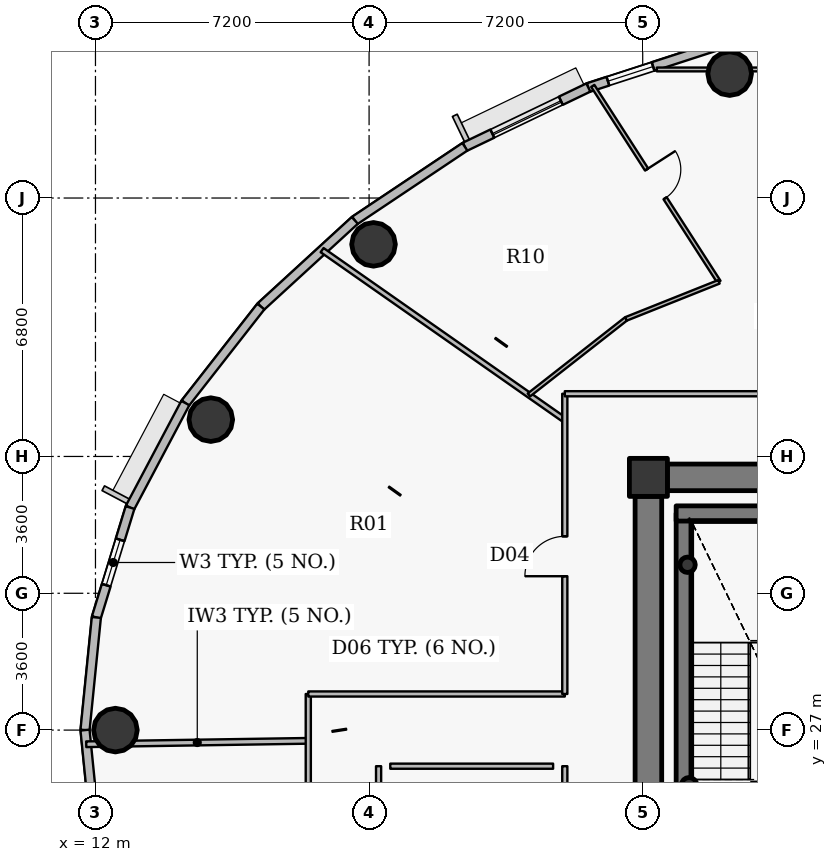
"""IFC4 building model, lengths in metres.
Left out: names, types, materials, properties, quantities, classifications, styles, units other than length and angle.
Written with IfcOpenShell. Run it as: python <this file> out.ifc"""

import sys

from ifc_helpers import new_model, si_unit, direction, frame, frame_2d, origin, origin_2d, place, context, subcontext, project, spatial, rectangle, hollow_circle, extrude, source, transform, mapped, element, fill, save


model = new_model("IFC4")
c1 = context("Model", 3, precision=1e-05, world=origin(), true_north=direction((0.0, 1.0)))
c2 = subcontext(c1, "Body", "Model", "MODEL_VIEW")
j1 = project(units=[si_unit("LENGTHUNIT", "METRE"), si_unit("PLANEANGLEUNIT", "RADIAN")], contexts=[c1])
p1 = place(None, origin())
s1 = spatial("IfcSite", under=j1, at=p1, CompositionType="ELEMENT")
p2 = place(p1, origin())
s2 = spatial("IfcBuilding", under=s1, at=p2, CompositionType="ELEMENT")
p3 = place(p2, frame((0.0, 0.0, 251.55)))
s3 = spatial("IfcBuildingStorey", under=s2, at=p3, CompositionType="ELEMENT", Elevation=251.55)
p4 = place(p3, frame((26.55, 33.65, 0.0), z_axis=(0.0, 0.0, 1.0), x_axis=(1.0, 0.0, 0.0)))
e1 = element("IfcColumn", 1, at=p4, inside=s3, PredefinedType="COLUMN", context=c2, shape_type="SweptSolid", body=[
    extrude(rectangle(XDim=1.0, YDim=1.0, at=origin_2d()), origin(), (0.0, 0.0, 1.0), 3.75),
])
p5 = place(p3, frame((27.48, 24.1, 0.0), z_axis=(0.0, 0.0, 1.0), x_axis=(0.0, 1.0, 0.0)))
e2 = element("IfcWall", 2, at=p5, inside=s3, PredefinedType="SHEAR", context=c2, shape_type="SweptSolid", body=[
    extrude(rectangle(XDim=8.6, YDim=0.4, at=frame_2d((4.3, 0.0))), origin(), (0.0, 0.0, 1.0), 3.75),
])
p6 = place(p3, frame((27.28, 32.7, 0.0), z_axis=(0.0, 0.0, 1.0), x_axis=(1.0, 0.0, 0.0)))
e3 = element("IfcWall", 3, at=p6, inside=s3, PredefinedType="SHEAR", context=c2, shape_type="SweptSolid", body=[
    extrude(rectangle(XDim=4.1, YDim=0.4, at=frame_2d((2.05, 0.0))), origin(), (0.0, 0.0, 1.0), 3.75),
])
for number, where, z_axis, x_axis in (
    (4, (27.58, 31.35, 0.0), (0.0, 0.0, 1.0), (1.0, 0.0, 0.0)),
    (5, (27.62, 25.55, 0.0), (0.0, 0.0, 1.0), (1.0, 0.0, 0.0)),
):
    element("IfcColumn", number, at=place(p3, frame(where, z_axis=z_axis, x_axis=x_axis)), inside=s3, PredefinedType="COLUMN", context=c2, shape_type="SweptSolid", body=[
        extrude(hollow_circle(Radius=0.203, WallThickness=0.016, at=origin_2d()), origin(), (0.0, 0.0, 1.0), 3.75),
    ])
p7 = place(p3, frame((27.05, 33.65, 0.0), z_axis=(0.0, 0.0, 1.0), x_axis=(1.0, 0.0, 0.0)))
e6 = element("IfcWall", 6, at=p7, inside=s3, PredefinedType="SHEAR", context=c2, shape_type="SweptSolid", body=[
    extrude(rectangle(XDim=17.9, YDim=0.7, at=frame_2d((8.95, 0.0))), origin(), (0.0, 0.0, 1.0), 3.05),
])
p8 = place(p7, frame((13.675, 0.0, 0.0)))
e7 = element("IfcOpeningElement", 7, at=p8, cuts=e6, PredefinedType="OPENING", context=c2, shape_type="SweptSolid", body=[
    extrude(rectangle(XDim=1.15, YDim=2.15, at=origin_2d()), frame((0.575, 0.36, 1.075), z_axis=(0.0, -1.0, 0.0), x_axis=(1.0, 0.0, 0.0)), (0.0, 0.0, 1.0), 0.72),
])
p9 = place(p3, frame((26.55, 20.85, 0.0), z_axis=(0.0, 0.0, 1.0), x_axis=(0.0, 1.0, 0.0)))
e8 = element("IfcWall", 8, at=p9, inside=s3, PredefinedType="SHEAR", context=c2, shape_type="SweptSolid", body=[
    extrude(rectangle(XDim=12.3, YDim=0.7, at=frame_2d((6.15, 0.0))), origin(), (0.0, 0.0, 1.0), 3.05),
])
p10 = place(p9, frame((1.085, 0.0, 0.0)))
e9 = element("IfcOpeningElement", 9, at=p10, cuts=e8, PredefinedType="OPENING", context=c2, shape_type="SweptSolid", body=[
    extrude(rectangle(XDim=1.15, YDim=2.15, at=origin_2d()), frame((0.575, 0.36, 1.075), z_axis=(0.0, -1.0, 0.0), x_axis=(1.0, 0.0, 0.0)), (0.0, 0.0, 1.0), 0.72),
])
for number, where, z_axis, x_axis in (
    (10, (28.688, 44.273, 0.0), (0.0, 0.0, 1.0), (1.0, 0.0, 0.0)),
    (11, (19.317, 39.781, 0.0), (0.0, 0.0, 1.0), (1.0, 0.0, 0.0)),
    (12, (15.035, 35.169, 0.0), (0.0, 0.0, 1.0), (1.0, 0.0, 0.0)),
    (13, (12.525, 27.0, 0.0), (0.0, 0.0, 1.0), (1.0, 0.0, 0.0)),
):
    element("IfcColumn", number, at=place(p3, frame(where, z_axis=z_axis, x_axis=x_axis)), inside=s3, PredefinedType="COLUMN", context=c2, shape_type="SweptSolid", body=[
        extrude(hollow_circle(Radius=0.575, WallThickness=0.036, at=origin_2d()), origin(), (0.0, 0.0, 1.0), 3.75),
    ])
p11 = place(p3, frame((24.969, 43.906, 0.0), z_axis=(0.0, 0.0, 1.0), x_axis=(0.951210789182, 0.308541787354, 0.0)))
e14 = element("IfcWall", 14, at=p11, inside=s3, PredefinedType="SOLIDWALL", context=c2, shape_type="SweptSolid", body=[
    extrude(rectangle(XDim=3.702, YDim=0.24, at=frame_2d((1.851, 0.0))), origin(), (0.0, 0.0, 1.0), 3.5),
])
p12 = place(p11, frame((0.542, 0.0, 0.9)))
e15 = element("IfcOpeningElement", 15, at=p12, cuts=e14, PredefinedType="OPENING", context=c2, shape_type="SweptSolid", body=[
    extrude(rectangle(XDim=1.25, YDim=1.65, at=origin_2d()), frame((0.625, 0.13, 0.825), z_axis=(0.0, -1.0, 0.0), x_axis=(1.0, 0.0, 0.0)), (0.0, 0.0, 1.0), 0.26),
])
p13 = place(p3, frame((21.72, 42.348, 0.0), z_axis=(0.0, 0.0, 1.0), x_axis=(0.901598104751, 0.432574684313, 0.0)))
e16 = element("IfcWall", 16, at=p13, inside=s3, PredefinedType="SOLIDWALL", context=c2, shape_type="SweptSolid", body=[
    extrude(rectangle(XDim=3.604, YDim=0.24, at=frame_2d((1.802, 0.0))), origin(), (0.0, 0.0, 1.0), 3.5),
])
p14 = place(p13, frame((0.802, 0.0, 0.9)))
e17 = element("IfcOpeningElement", 17, at=p14, cuts=e16, PredefinedType="OPENING", context=c2, shape_type="SweptSolid", body=[
    extrude(rectangle(XDim=2.0, YDim=1.75, at=origin_2d()), frame((1.0, 0.13, 0.875), z_axis=(0.0, -1.0, 0.0), x_axis=(1.0, 0.0, 0.0)), (0.0, 0.0, 1.0), 0.26),
])
p15 = place(p3, frame((18.824, 40.411, 0.0), z_axis=(0.0, 0.0, 1.0), x_axis=(0.831262496074, 0.555880079352, 0.0)))
e18 = element("IfcWall", 18, at=p15, inside=s3, PredefinedType="SOLIDWALL", context=c2, shape_type="SweptSolid", body=[
    extrude(rectangle(XDim=3.484, YDim=0.24, at=frame_2d((1.742, 0.0))), origin(), (0.0, 0.0, 1.0), 3.5),
])
p16 = place(p3, frame((16.352, 38.145, 0.0), z_axis=(0.0, 0.0, 1.0), x_axis=(0.737123922599, 0.675757591694, 0.0)))
e19 = element("IfcWall", 19, at=p16, inside=s3, PredefinedType="SOLIDWALL", context=c2, shape_type="SweptSolid", body=[
    extrude(rectangle(XDim=3.354, YDim=0.24, at=frame_2d((1.677, 0.0))), origin(), (0.0, 0.0, 1.0), 3.5),
])
p17 = place(p3, frame((14.364, 35.605, 0.0), z_axis=(0.0, 0.0, 1.0), x_axis=(0.616312344705, 0.787501805562, 0.0)))
e20 = element("IfcWall", 20, at=p17, inside=s3, PredefinedType="SOLIDWALL", context=c2, shape_type="SweptSolid", body=[
    extrude(rectangle(XDim=3.225, YDim=0.24, at=frame_2d((1.612, 0.0))), origin(), (0.0, 0.0, 1.0), 3.5),
])
p18 = place(p3, frame((12.91, 32.856, 0.0), z_axis=(0.0, 0.0, 1.0), x_axis=(0.46766049993, 0.883908172157, 0.0)))
e21 = element("IfcWall", 21, at=p18, inside=s3, PredefinedType="SOLIDWALL", context=c2, shape_type="SweptSolid", body=[
    extrude(rectangle(XDim=3.11, YDim=0.24, at=frame_2d((1.555, 0.0))), origin(), (0.0, 0.0, 1.0), 3.5),
])
p19 = place(p3, frame((12.023, 29.964, 0.0), z_axis=(0.0, 0.0, 1.0), x_axis=(0.293132907334, 0.95607170162, 0.0)))
e22 = element("IfcWall", 22, at=p19, inside=s3, PredefinedType="SOLIDWALL", context=c2, shape_type="SweptSolid", body=[
    extrude(rectangle(XDim=3.025, YDim=0.24, at=frame_2d((1.512, 0.0))), origin(), (0.0, 0.0, 1.0), 3.5),
])
p20 = place(p19, frame((0.887, 0.0, 0.9)))
e23 = element("IfcOpeningElement", 23, at=p20, cuts=e22, PredefinedType="OPENING", context=c2, shape_type="SweptSolid", body=[
    extrude(rectangle(XDim=1.25, YDim=1.65, at=origin_2d()), frame((0.625, 0.13, 0.825), z_axis=(0.0, -1.0, 0.0), x_axis=(1.0, 0.0, 0.0)), (0.0, 0.0, 1.0), 0.26),
])
for number, where, z_axis, x_axis in (
    (24, (11.725, 27.0, 0.0), (0.0, 0.0, 1.0), (0.1, 0.995, 0.0)),
    (25, (12.023, 24.036, 0.0), (0.0, 0.0, 1.0), (-0.1, 0.995, 0.0)),
):
    element("IfcWall", number, at=place(p3, frame(where, z_axis=z_axis, x_axis=x_axis)), inside=s3, PredefinedType="SOLIDWALL", context=c2, shape_type="SweptSolid", body=[
        extrude(rectangle(XDim=2.979, YDim=0.24, at=frame_2d((1.489, 0.0))), origin(), (0.0, 0.0, 1.0), 3.5),
    ])
p21 = place(p3, frame((11.757, 26.628, 0.0), z_axis=(0.0, 0.0, 1.0), x_axis=(0.999882437841, 0.015333313333, 0.0)))
e26 = element("IfcWall", 26, at=p21, inside=s3, PredefinedType="PARTITIONING", context=c2, shape_type="SweptSolid", body=[
    extrude(rectangle(XDim=5.844, YDim=0.15, at=frame_2d((2.922, 0.0))), origin(), (0.0, 0.0, 1.0), 2.985),
])
p22 = place(p3, frame((17.6, 23.423, 0.0), z_axis=(0.0, 0.0, 1.0), x_axis=(0.0, 1.0, 0.0)))
e27 = element("IfcWall", 27, at=p22, inside=s3, PredefinedType="PARTITIONING", context=c2, shape_type="SweptSolid", body=[
    extrude(rectangle(XDim=4.527, YDim=0.135, at=frame_2d((2.263, 0.0))), origin(), (0.0, 0.0, 1.0), 2.935),
])
p23 = place(p22, frame((1.257, 0.0, 0.0)))
e28 = element("IfcOpeningElement", 28, at=p23, cuts=e27, PredefinedType="OPENING", context=c2, shape_type="SweptSolid", body=[
    extrude(rectangle(XDim=0.82, YDim=2.1, at=origin_2d()), frame((0.41, 0.078, 1.05), z_axis=(0.0, -1.0, 0.0), x_axis=(1.0, 0.0, 0.0)), (0.0, 0.0, 1.0), 0.155),
])
p24 = place(p3, frame((17.6, 27.95, 0.0), z_axis=(0.0, 0.0, 1.0), x_axis=(1.0, 0.0, 0.0)))
e29 = element("IfcWall", 29, at=p24, inside=s3, PredefinedType="PARTITIONING", context=c2, shape_type="SweptSolid", body=[
    extrude(rectangle(XDim=6.75, YDim=0.135, at=frame_2d((3.375, 0.0))), origin(), (0.0, 0.0, 1.0), 3.5),
])
p25 = place(p3, frame((17.964, 39.629, 0.0), z_axis=(0.0, 0.0, 1.0), x_axis=(0.819162769896, -0.573561118292, 0.0)))
e30 = element("IfcWall", 30, at=p25, inside=s3, PredefinedType="PARTITIONING", context=c2, shape_type="SweptSolid", body=[
    extrude(rectangle(XDim=7.796, YDim=0.135, at=frame_2d((3.898, 0.0))), origin(), (0.0, 0.0, 1.0), 2.985),
])
p26 = place(p3, frame((23.406, 35.819, 0.0), z_axis=(0.0, 0.0, 1.0), x_axis=(0.787387506959, 0.616458363465, 0.0)))
e31 = element("IfcWall", 31, at=p26, inside=s3, PredefinedType="PARTITIONING", context=c2, shape_type="SweptSolid", body=[
    extrude(rectangle(XDim=3.245, YDim=0.1, at=frame_2d((1.623, 0.0))), origin(), (0.0, 0.0, 1.0), 2.935),
])
p27 = place(p3, frame((24.35, 27.95, 0.0), z_axis=(0.0, 0.0, 1.0), x_axis=(0.0, 1.0, 0.0)))
e32 = element("IfcWall", 32, at=p27, inside=s3, PredefinedType="PARTITIONING", context=c2, shape_type="SweptSolid", body=[
    extrude(rectangle(XDim=7.9, YDim=0.135, at=frame_2d((3.95, 0.0))), origin(), (0.0, 0.0, 1.0), 2.935),
])
p28 = place(p27, frame((3.099, 0.0, 0.0)))
e33 = element("IfcOpeningElement", 33, at=p28, cuts=e32, PredefinedType="OPENING", context=c2, shape_type="SweptSolid", body=[
    extrude(rectangle(XDim=1.05, YDim=2.15, at=origin_2d()), frame((0.525, 0.078, 1.075), z_axis=(0.0, -1.0, 0.0), x_axis=(1.0, 0.0, 0.0)), (0.0, 0.0, 1.0), 0.155),
])
p29 = place(p3, frame((24.35, 35.85, 0.0), z_axis=(0.0, 0.0, 1.0), x_axis=(1.0, 0.0, 0.0)))
e34 = element("IfcWall", 34, at=p29, inside=s3, PredefinedType="PARTITIONING", context=c2, shape_type="SweptSolid", body=[
    extrude(rectangle(XDim=26.218, YDim=0.135, at=frame_2d((13.109, 0.0))), origin(), (0.0, 0.0, 1.0), 2.935),
])
p30 = place(p29, frame((8.045, 0.0, 0.0)))
e35 = element("IfcOpeningElement", 35, at=p30, cuts=e34, PredefinedType="OPENING", context=c2, shape_type="SweptSolid", body=[
    extrude(rectangle(XDim=1.0, YDim=2.15, at=origin_2d()), frame((0.5, 0.078, 1.075), z_axis=(0.0, -1.0, 0.0), x_axis=(1.0, 0.0, 0.0)), (0.0, 0.0, 1.0), 0.155),
])
p31 = place(p3, frame((25.086, 43.95, 0.0), z_axis=(0.0, 0.0, 1.0), x_axis=(0.54137931016, -0.840778474112, 0.0)))
e36 = element("IfcWall", 36, at=p31, inside=s3, PredefinedType="PARTITIONING", context=c2, shape_type="SweptSolid", body=[
    extrude(rectangle(XDim=6.131, YDim=0.1, at=frame_2d((3.066, 0.0))), origin(), (0.0, 0.0, 1.0), 2.985),
])
p32 = place(p31, frame((2.615, 0.0, 0.0)))
e37 = element("IfcOpeningElement", 37, at=p32, cuts=e36, PredefinedType="OPENING", context=c2, shape_type="SweptSolid", body=[
    extrude(rectangle(XDim=0.9, YDim=2.1, at=origin_2d()), frame((0.45, 0.06, 1.05), z_axis=(0.0, -1.0, 0.0), x_axis=(1.0, 0.0, 0.0)), (0.0, 0.0, 1.0), 0.12),
])
p33 = place(p3, frame((25.961, 37.819, 0.0), z_axis=(0.0, 0.0, 1.0), x_axis=(0.928796141516, 0.370591051572, 0.0)))
e38 = element("IfcWall", 38, at=p33, inside=s3, PredefinedType="PARTITIONING", context=c2, shape_type="SweptSolid", body=[
    extrude(rectangle(XDim=2.633, YDim=0.1, at=frame_2d((1.316, 0.0))), origin(), (0.0, 0.0, 1.0), 3.5),
])
p34 = place(p3, frame((26.772, 44.383, 0.0), z_axis=(0.0, 0.0, 1.0), x_axis=(1.0, 0.0, 0.0)))
e39 = element("IfcWall", 39, at=p34, inside=s3, PredefinedType="PARTITIONING", context=c2, shape_type="SweptSolid", body=[
    extrude(rectangle(XDim=5.99, YDim=0.1, at=frame_2d((2.995, 0.0))), origin(), (0.0, 0.0, 1.0), 2.985),
])
p35 = place(p34, frame((4.582, 0.0, 0.0)))
e40 = element("IfcOpeningElement", 40, at=p35, cuts=e39, PredefinedType="OPENING", context=c2, shape_type="SweptSolid", body=[
    extrude(rectangle(XDim=0.9, YDim=2.1, at=origin_2d()), frame((0.45, 0.06, 1.05), z_axis=(0.0, -1.0, 0.0), x_axis=(1.0, 0.0, 0.0)), (0.0, 0.0, 1.0), 0.12),
])
p36 = place(p3, frame((19.45, 26.05, 0.0), z_axis=(0.0, 0.0, 1.0), x_axis=(0.0, -1.0, 0.0)))
e41 = element("IfcWall", 41, at=p36, inside=s3, PredefinedType="PARTITIONING", context=c2, shape_type="SweptSolid", body=[
    extrude(rectangle(XDim=2.257, YDim=0.135, at=frame_2d((1.128, 0.0))), origin(), (0.0, 0.0, 1.0), 3.5),
])
p37 = place(p3, frame((27.04, 34.0, 0.0), z_axis=(0.0, 0.0, 1.0), x_axis=(-1.0, 0.0, 0.0)))
e42 = element("IfcWall", 42, at=p37, inside=s3, PredefinedType="PARTITIONING", context=c2, shape_type="SweptSolid", body=[
    extrude(rectangle(XDim=0.84, YDim=0.135, at=frame_2d((0.42, 0.0))), origin(), (0.0, 0.0, 1.0), 2.935),
])
p38 = place(p3, frame((26.2, 33.692, 0.0), z_axis=(0.0, 0.0, 1.0), x_axis=(0.0, -1.0, 0.0)))
e43 = element("IfcWall", 43, at=p38, inside=s3, PredefinedType="PARTITIONING", context=c2, shape_type="SweptSolid", body=[
    extrude(rectangle(XDim=0.532, YDim=0.135, at=frame_2d((0.266, 0.0))), origin(), (0.0, 0.0, 1.0), 3.5),
])
p39 = place(p3, frame((24.35, 24.745, 0.0), z_axis=(0.0, 0.0, 1.0), x_axis=(0.0, 1.0, 0.0)))
e44 = element("IfcWall", 44, at=p39, inside=s3, PredefinedType="PARTITIONING", context=c2, shape_type="SweptSolid", body=[
    extrude(rectangle(XDim=1.305, YDim=0.135, at=frame_2d((0.652, 0.0))), origin(), (0.0, 0.0, 1.0), 3.5),
])
p40 = place(p3, frame((24.042, 26.05, 0.0), z_axis=(0.0, 0.0, 1.0), x_axis=(-1.0, 0.0, 0.0)))
e45 = element("IfcWall", 45, at=p40, inside=s3, PredefinedType="PARTITIONING", context=c2, shape_type="SweptSolid", body=[
    extrude(rectangle(XDim=4.285, YDim=0.135, at=frame_2d((2.143, 0.0))), origin(), (0.0, 0.0, 1.0), 3.5),
])
m1 = source(origin(), c2, "Body", "SweptSolid", [
    extrude(rectangle(XDim=2.0, YDim=1.75, at=origin_2d()), frame((1.0, 0.03, 0.875), z_axis=(0.0, -1.0, 0.0), x_axis=(1.0, 0.0, 0.0)), (0.0, 0.0, 1.0), 0.06),
])
p41 = place(p14, origin())
e46 = element("IfcWindow", 46, at=p41, inside=s3, PartitioningType="DOUBLE_PANEL_VERTICAL", PredefinedType="WINDOW", context=c2, shape_type="MappedRepresentation", body=[
    mapped(m1, transform((0.0, 0.0, 0.0), x_axis=(1.0, 0.0, 0.0), y_axis=(0.0, 1.0, 0.0), z_axis=(0.0, 0.0, 1.0), scale=1.0)),
])
fill(e17, e46)
m2 = source(origin(), c2, "Body", "SweptSolid", [
    extrude(rectangle(XDim=1.25, YDim=1.65, at=origin_2d()), frame((0.625, 0.03, 0.825), z_axis=(0.0, -1.0, 0.0), x_axis=(1.0, 0.0, 0.0)), (0.0, 0.0, 1.0), 0.06),
])
p42 = place(p20, origin())
e47 = element("IfcWindow", 47, at=p42, inside=s3, PartitioningType="SINGLE_PANEL", PredefinedType="WINDOW", context=c2, shape_type="MappedRepresentation", body=[
    mapped(m2, transform((0.0, 0.0, 0.0), x_axis=(1.0, 0.0, 0.0), y_axis=(0.0, 1.0, 0.0), z_axis=(0.0, 0.0, 1.0), scale=1.0)),
])
fill(e23, e47)
p43 = place(p12, origin())
e48 = element("IfcWindow", 48, at=p43, inside=s3, PartitioningType="SINGLE_PANEL", PredefinedType="WINDOW", context=c2, shape_type="MappedRepresentation", body=[
    mapped(m2, transform((0.0, 0.0, 0.0), x_axis=(1.0, 0.0, 0.0), y_axis=(0.0, 1.0, 0.0), z_axis=(0.0, 0.0, 1.0), scale=1.0)),
])
fill(e15, e48)
m3 = source(origin(), c2, "Body", "SweptSolid", [
    extrude(rectangle(XDim=0.9, YDim=2.1, at=origin_2d()), frame((0.45, 0.025, 1.05), z_axis=(0.0, -1.0, 0.0), x_axis=(1.0, 0.0, 0.0)), (0.0, 0.0, 1.0), 0.05),
])
p44 = place(p32, origin())
e49 = element("IfcDoor", 49, at=p44, inside=s3, OperationType="SINGLE_SWING_LEFT", PredefinedType="DOOR", context=c2, shape_type="MappedRepresentation", body=[
    mapped(m3, transform((0.0, 0.0, 0.0), x_axis=(1.0, 0.0, 0.0), y_axis=(0.0, 1.0, 0.0), z_axis=(0.0, 0.0, 1.0), scale=1.0)),
])
fill(e37, e49)
m4 = source(origin(), c2, "Body", "SweptSolid", [
    extrude(rectangle(XDim=1.05, YDim=2.15, at=origin_2d()), frame((0.525, 0.025, 1.075), z_axis=(0.0, -1.0, 0.0), x_axis=(1.0, 0.0, 0.0)), (0.0, 0.0, 1.0), 0.05),
])
p45 = place(p28, origin())
e50 = element("IfcDoor", 50, at=p45, inside=s3, OperationType="SINGLE_SWING_LEFT", PredefinedType="DOOR", context=c2, shape_type="MappedRepresentation", body=[
    mapped(m4, transform((0.0, 0.0, 0.0), x_axis=(1.0, 0.0, 0.0), y_axis=(0.0, 1.0, 0.0), z_axis=(0.0, 0.0, 1.0), scale=1.0)),
])
fill(e33, e50)
save(model, sys.argv[1])
